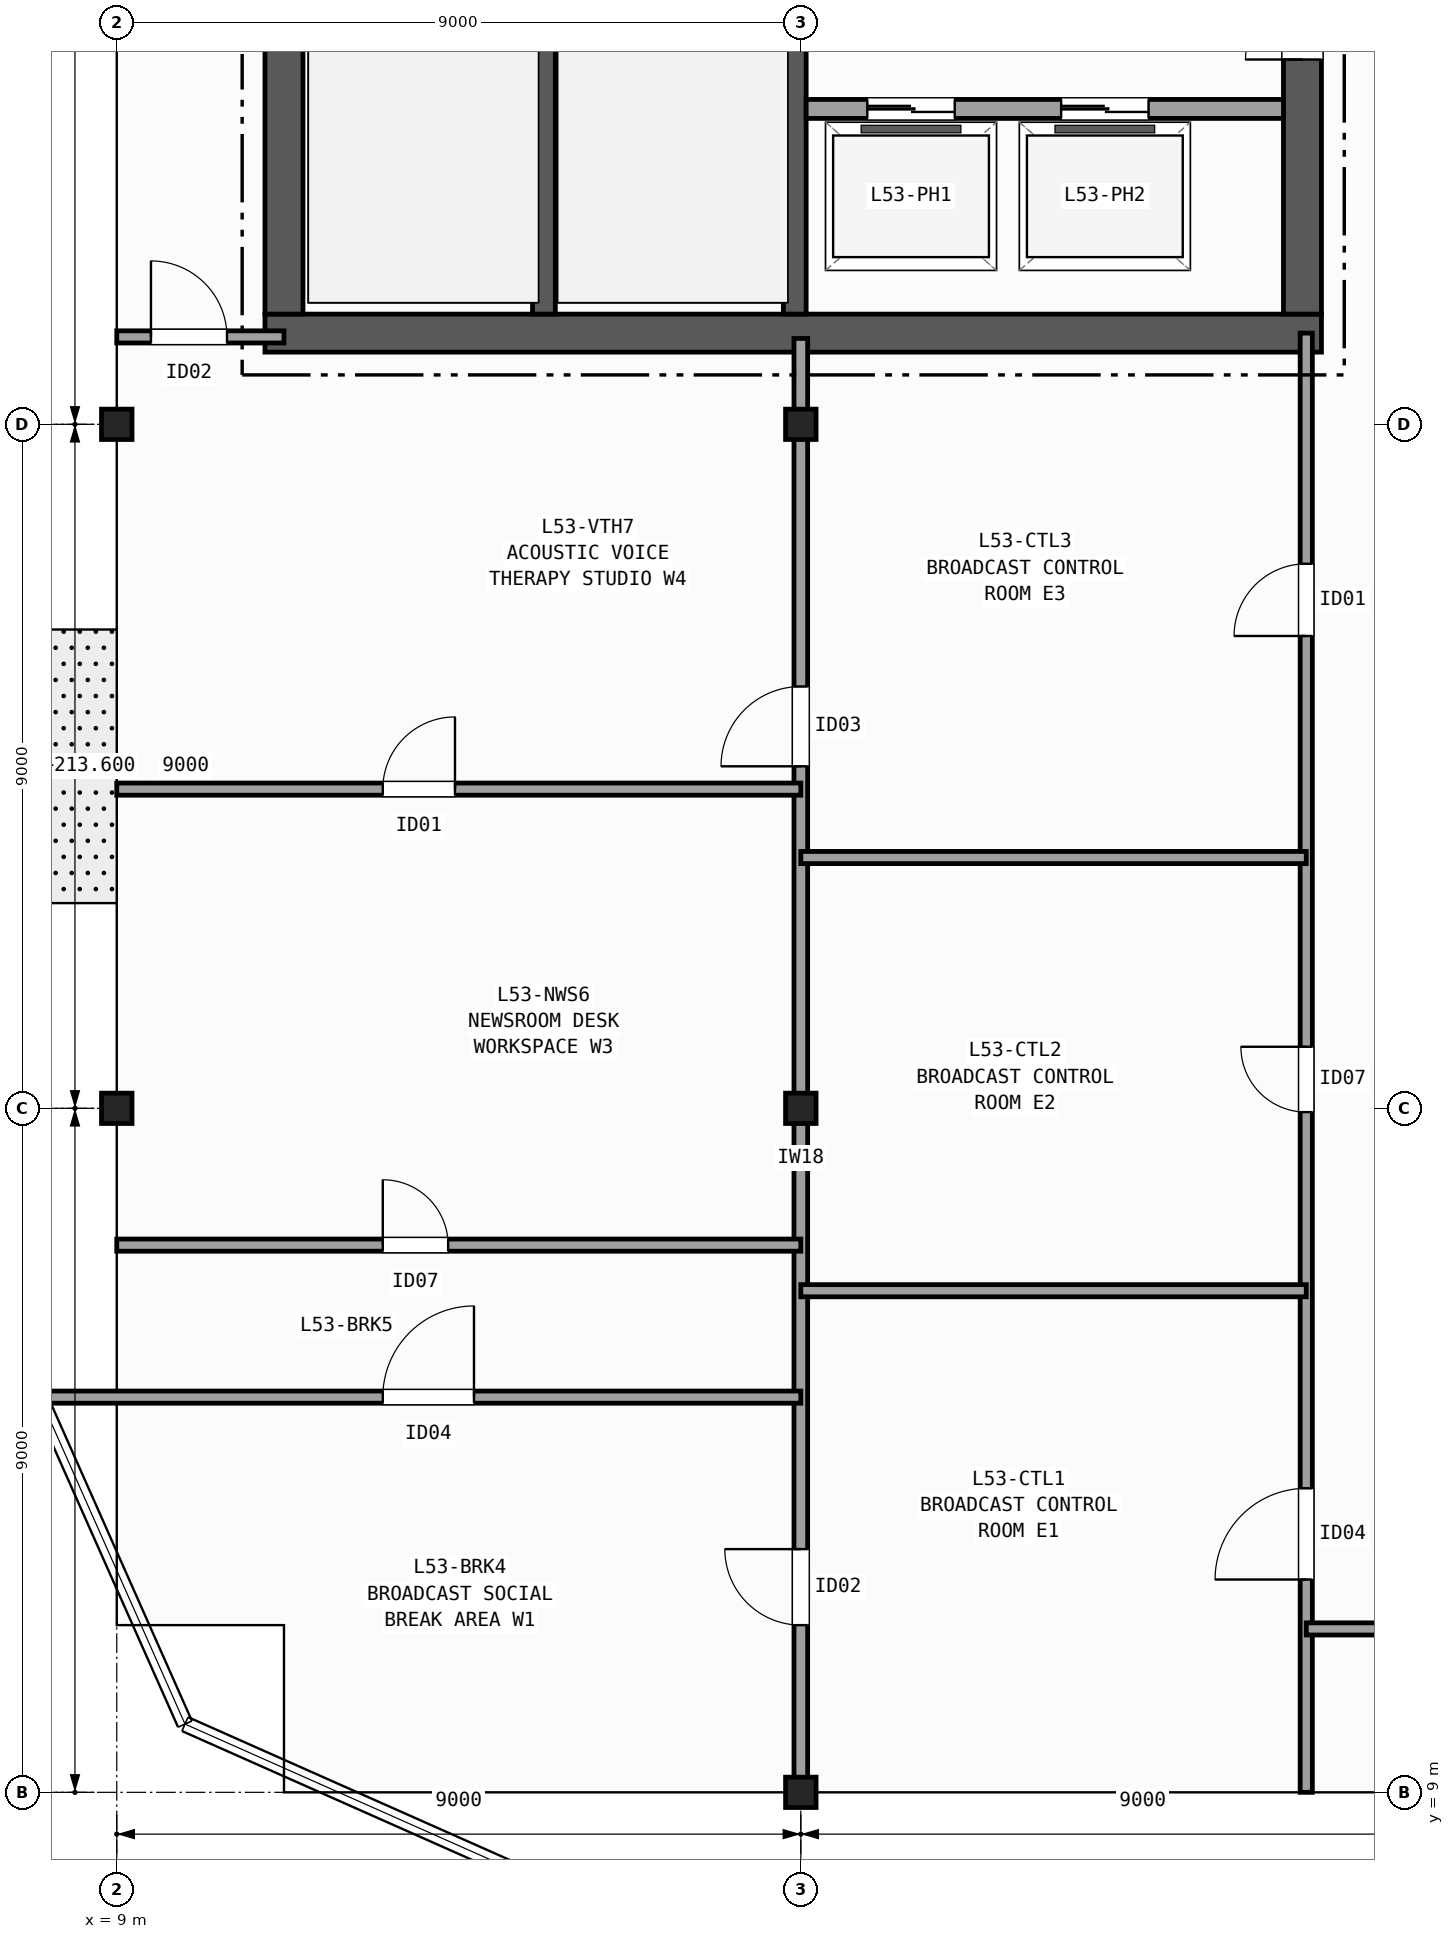
"""IFC4 building model, lengths in metres.
Left out: names, types, materials, properties, quantities, classifications, styles, units other than length and angle.
Written with IfcOpenShell. Run it as: python <this file> out.ifc"""

import sys

from ifc_helpers import new_model, si_unit, direction, frame, frame_2d, origin, origin_2d, place, context, subcontext, project, spatial, rectangle, i_section, extrude, element, fill, save


model = new_model("IFC4")
c1 = context("Model", 3, precision=1e-05, world=origin(), true_north=direction((0.0, 1.0)))
c2 = subcontext(c1, "Body", "Model", "MODEL_VIEW")
j1 = project(units=[si_unit("LENGTHUNIT", "METRE"), si_unit("PLANEANGLEUNIT", "RADIAN")], contexts=[c1])
p1 = place(None, origin())
s1 = spatial("IfcSite", under=j1, at=p1, CompositionType="ELEMENT")
p2 = place(p1, origin())
s2 = spatial("IfcBuilding", under=s1, at=p2, CompositionType="ELEMENT")
p3 = place(p2, frame((0.0, 0.0, 213.6)))
s3 = spatial("IfcBuildingStorey", under=s2, at=p3, CompositionType="ELEMENT", Elevation=213.6)
for number, where, z_axis, x_axis in (
    (1, (9.0, 18.0, 0.0), (0.0, 0.0, 1.0), (1.0, 0.0, 0.0)),
    (2, (9.0, 27.0, 0.0), (0.0, 0.0, 1.0), (1.0, 0.0, 0.0)),
    (3, (18.0, 9.0, 0.0), (0.0, 0.0, 1.0), (1.0, 0.0, 0.0)),
    (4, (18.0, 18.0, 0.0), (0.0, 0.0, 1.0), (1.0, 0.0, 0.0)),
    (5, (18.0, 27.0, 0.0), (0.0, 0.0, 1.0), (1.0, 0.0, 0.0)),
):
    element("IfcColumn", number, at=place(p3, frame(where, z_axis=z_axis, x_axis=x_axis)), inside=s3, PredefinedType="COLUMN", context=c2, shape_type="SweptSolid", body=[
        extrude(i_section(OverallWidth=0.401, OverallDepth=0.399, WebThickness=0.025, FlangeThickness=0.04, FilletRadius=0.015, at=origin_2d()), origin(), (0.0, 0.0, 1.0), 3.7),
    ])
p4 = place(p3, frame((10.95, 28.2, 0.0), z_axis=(0.0, 0.0, 1.0), x_axis=(1.0, 0.0, 0.0)))
e6 = element("IfcWall", 6, at=p4, inside=s3, PredefinedType="SHEAR", context=c2, shape_type="SweptSolid", body=[
    extrude(rectangle(XDim=13.9, YDim=0.5, at=frame_2d((6.95, 0.0))), origin(), (0.0, 0.0, 1.0), 3.42),
])
p5 = place(p3, frame((11.2, 42.15, 0.0), z_axis=(0.0, 0.0, 1.0), x_axis=(0.0, -1.0, 0.0)))
e7 = element("IfcWall", 7, at=p5, inside=s3, PredefinedType="SHEAR", context=c2, shape_type="SweptSolid", body=[
    extrude(rectangle(XDim=13.7, YDim=0.5, at=frame_2d((6.85, 0.0))), origin(), (0.0, 0.0, 1.0), 3.42),
])
p6 = place(p3, frame((24.6, 28.45, 0.0), z_axis=(0.0, 0.0, 1.0), x_axis=(0.0, 1.0, 0.0)))
e8 = element("IfcWall", 8, at=p6, inside=s3, PredefinedType="SHEAR", context=c2, shape_type="SweptSolid", body=[
    extrude(rectangle(XDim=13.7, YDim=0.5, at=frame_2d((6.85, 0.0))), origin(), (0.0, 0.0, 1.0), 3.42),
])
p7 = place(p6, frame((3.35, 0.0, 0.0)))
e9 = element("IfcOpeningElement", 9, at=p7, cuts=e8, PredefinedType="OPENING", context=c2, shape_type="SweptSolid", body=[
    extrude(rectangle(XDim=1.5, YDim=2.2, at=frame_2d((0.75, 1.1))), frame((0.0, 0.26, 0.0), z_axis=(0.0, -1.0, 0.0), x_axis=(1.0, 0.0, 0.0)), (0.0, 0.0, 1.0), 0.52),
])
p8 = place(p6, frame((9.95, 0.0, 0.0)))
e10 = element("IfcOpeningElement", 10, at=p8, cuts=e8, PredefinedType="OPENING", context=c2, shape_type="SweptSolid", body=[
    extrude(rectangle(XDim=0.9, YDim=2.1, at=frame_2d((0.45, 1.05))), frame((0.0, 0.26, 0.0), z_axis=(0.0, -1.0, 0.0), x_axis=(1.0, 0.0, 0.0)), (0.0, 0.0, 1.0), 0.52),
])
p9 = place(p3, frame((14.62, 28.45, 0.0), z_axis=(0.0, 0.0, 1.0), x_axis=(0.0, 1.0, 0.0)))
e11 = element("IfcWall", 11, at=p9, inside=s3, PredefinedType="SHEAR", context=c2, shape_type="SweptSolid", body=[
    extrude(rectangle(XDim=9.0, YDim=0.3, at=frame_2d((4.5, 0.0))), origin(), (0.0, 0.0, 1.0), 3.42),
])
p10 = place(p3, frame((17.92, 42.15, 0.0), z_axis=(0.0, 0.0, 1.0), x_axis=(0.0, -1.0, 0.0)))
e12 = element("IfcWall", 12, at=p10, inside=s3, PredefinedType="SHEAR", context=c2, shape_type="SweptSolid", body=[
    extrude(rectangle(XDim=13.7, YDim=0.3, at=frame_2d((6.85, 0.0))), origin(), (0.0, 0.0, 1.0), 3.42),
])
p11 = place(p10, frame((1.975, 0.0, 0.0)))
e13 = element("IfcOpeningElement", 13, at=p11, cuts=e12, PredefinedType="OPENING", context=c2, shape_type="SweptSolid", body=[
    extrude(rectangle(XDim=1.15, YDim=2.15, at=frame_2d((0.575, 1.075))), frame((0.0, 0.16, 0.0), z_axis=(0.0, -1.0, 0.0), x_axis=(1.0, 0.0, 0.0)), (0.0, 0.0, 1.0), 0.32),
])
p12 = place(p3, frame((18.07, 31.15, 0.0), z_axis=(0.0, 0.0, 1.0), x_axis=(1.0, 0.0, 0.0)))
e14 = element("IfcWall", 14, at=p12, inside=s3, PredefinedType="PARTITIONING", context=c2, shape_type="SweptSolid", body=[
    extrude(rectangle(XDim=6.28, YDim=0.25, at=frame_2d((3.14, 0.0))), origin(), (0.0, 0.0, 1.0), 3.42),
])
p13 = place(p12, frame((0.805, 0.0, 0.0)))
e15 = element("IfcOpeningElement", 15, at=p13, cuts=e14, PredefinedType="OPENING", context=c2, shape_type="SweptSolid", body=[
    extrude(rectangle(XDim=1.15, YDim=2.15, at=frame_2d((0.575, 1.075))), frame((0.0, 0.135, 0.0), z_axis=(0.0, -1.0, 0.0), x_axis=(1.0, 0.0, 0.0)), (0.0, 0.0, 1.0), 0.27),
])
p14 = place(p12, frame((3.355, 0.0, 0.0)))
e16 = element("IfcOpeningElement", 16, at=p14, cuts=e14, PredefinedType="OPENING", context=c2, shape_type="SweptSolid", body=[
    extrude(rectangle(XDim=1.15, YDim=2.15, at=frame_2d((0.575, 1.075))), frame((0.0, 0.135, 0.0), z_axis=(0.0, -1.0, 0.0), x_axis=(1.0, 0.0, 0.0)), (0.0, 0.0, 1.0), 0.27),
])
p15 = place(p3, frame((9.0, 28.15, 0.0), z_axis=(0.0, 0.0, 1.0), x_axis=(1.0, 0.0, 0.0)))
e17 = element("IfcWall", 17, at=p15, inside=s3, PredefinedType="PARTITIONING", context=c2, shape_type="SweptSolid", body=[
    extrude(rectangle(XDim=2.2, YDim=0.16, at=frame_2d((1.1, 0.0))), origin(), (0.0, 0.0, 1.0), 2.707),
])
p16 = place(p15, frame((0.45, 0.0, 0.0)))
e18 = element("IfcOpeningElement", 18, at=p16, cuts=e17, PredefinedType="OPENING", context=c2, shape_type="SweptSolid", body=[
    extrude(rectangle(XDim=1.0, YDim=2.1, at=frame_2d((0.5, 1.05))), frame((0.0, 0.09, 0.0), z_axis=(0.0, -1.0, 0.0), x_axis=(1.0, 0.0, 0.0)), (0.0, 0.0, 1.0), 0.18),
])
p17 = place(p3, frame((24.65, 9.0, 0.0), z_axis=(0.0, 0.0, 1.0), x_axis=(0.0, 1.0, 0.0)))
e19 = element("IfcWall", 19, at=p17, inside=s3, PredefinedType="PARTITIONING", context=c2, shape_type="SweptSolid", body=[
    extrude(rectangle(XDim=19.2, YDim=0.16, at=frame_2d((9.6, 0.0))), origin(), (0.0, 0.0, 1.0), 2.707),
])
p18 = place(p17, frame((2.8, 0.0, 0.0)))
e20 = element("IfcOpeningElement", 20, at=p18, cuts=e19, PredefinedType="OPENING", context=c2, shape_type="SweptSolid", body=[
    extrude(rectangle(XDim=1.2, YDim=2.15, at=frame_2d((0.6, 1.075))), frame((0.0, 0.09, 0.0), z_axis=(0.0, -1.0, 0.0), x_axis=(1.0, 0.0, 0.0)), (0.0, 0.0, 1.0), 0.18),
])
p19 = place(p17, frame((8.95, 0.0, 0.0)))
e21 = element("IfcOpeningElement", 21, at=p19, cuts=e19, PredefinedType="OPENING", context=c2, shape_type="SweptSolid", body=[
    extrude(rectangle(XDim=0.86, YDim=2.05, at=frame_2d((0.43, 1.025))), frame((0.0, 0.09, 0.0), z_axis=(0.0, -1.0, 0.0), x_axis=(1.0, 0.0, 0.0)), (0.0, 0.0, 1.0), 0.18),
])
p20 = place(p17, frame((15.215, 0.0, 0.0)))
e22 = element("IfcOpeningElement", 22, at=p20, cuts=e19, PredefinedType="OPENING", context=c2, shape_type="SweptSolid", body=[
    extrude(rectangle(XDim=0.95, YDim=2.1, at=frame_2d((0.475, 1.05))), frame((0.0, 0.09, 0.0), z_axis=(0.0, -1.0, 0.0), x_axis=(1.0, 0.0, 0.0)), (0.0, 0.0, 1.0), 0.18),
])
p21 = place(p3, frame((18.0, 9.0, 0.0), z_axis=(0.0, 0.0, 1.0), x_axis=(0.0, 1.0, 0.0)))
e23 = element("IfcWall", 23, at=p21, inside=s3, PredefinedType="PARTITIONING", context=c2, shape_type="SweptSolid", body=[
    extrude(rectangle(XDim=19.13, YDim=0.18, at=frame_2d((9.565, 0.0))), origin(), (0.0, 0.0, 1.0), 2.707),
])
p22 = place(p21, frame((2.2, 0.0, 0.0)))
e24 = element("IfcOpeningElement", 24, at=p22, cuts=e23, PredefinedType="OPENING", context=c2, shape_type="SweptSolid", body=[
    extrude(rectangle(XDim=1.0, YDim=2.1, at=frame_2d((0.5, 1.05))), frame((0.0, 0.1, 0.0), z_axis=(0.0, -1.0, 0.0), x_axis=(1.0, 0.0, 0.0)), (0.0, 0.0, 1.0), 0.2),
])
p23 = place(p21, frame((13.5, 0.0, 0.0)))
e25 = element("IfcOpeningElement", 25, at=p23, cuts=e23, PredefinedType="OPENING", context=c2, shape_type="SweptSolid", body=[
    extrude(rectangle(XDim=1.05, YDim=2.15, at=frame_2d((0.525, 1.075))), frame((0.0, 0.1, 0.0), z_axis=(0.0, -1.0, 0.0), x_axis=(1.0, 0.0, 0.0)), (0.0, 0.0, 1.0), 0.2),
])
p24 = place(p3, frame((18.0, 15.6, 0.0), z_axis=(0.0, 0.0, 1.0), x_axis=(1.0, 0.0, 0.0)))
e26 = element("IfcWall", 26, at=p24, inside=s3, PredefinedType="PARTITIONING", context=c2, shape_type="SweptSolid", body=[
    extrude(rectangle(XDim=6.65, YDim=0.16, at=frame_2d((3.325, 0.0))), origin(), (0.0, 0.0, 1.0), 2.789),
])
p25 = place(p3, frame((18.0, 21.3, 0.0), z_axis=(0.0, 0.0, 1.0), x_axis=(1.0, 0.0, 0.0)))
e27 = element("IfcWall", 27, at=p25, inside=s3, PredefinedType="PARTITIONING", context=c2, shape_type="SweptSolid", body=[
    extrude(rectangle(XDim=6.65, YDim=0.16, at=frame_2d((3.325, 0.0))), origin(), (0.0, 0.0, 1.0), 2.792),
])
p26 = place(p3, frame((7.987, 14.2, 0.0), z_axis=(0.0, 0.0, 1.0), x_axis=(1.0, 0.0, 0.0)))
e28 = element("IfcWall", 28, at=p26, inside=s3, PredefinedType="PARTITIONING", context=c2, shape_type="SweptSolid", body=[
    extrude(rectangle(XDim=10.013, YDim=0.16, at=frame_2d((5.006, 0.0))), origin(), (0.0, 0.0, 1.0), 2.792),
])
p27 = place(p26, frame((4.513, 0.0, 0.0)))
e29 = element("IfcOpeningElement", 29, at=p27, cuts=e28, PredefinedType="OPENING", context=c2, shape_type="SweptSolid", body=[
    extrude(rectangle(XDim=1.2, YDim=2.15, at=frame_2d((0.6, 1.075))), frame((0.0, 0.09, 0.0), z_axis=(0.0, -1.0, 0.0), x_axis=(1.0, 0.0, 0.0)), (0.0, 0.0, 1.0), 0.18),
])
p28 = place(p3, frame((9.0, 16.2, 0.0), z_axis=(0.0, 0.0, 1.0), x_axis=(1.0, 0.0, 0.0)))
e30 = element("IfcWall", 30, at=p28, inside=s3, PredefinedType="PARTITIONING", context=c2, shape_type="SweptSolid", body=[
    extrude(rectangle(XDim=9.0, YDim=0.16, at=frame_2d((4.5, 0.0))), origin(), (0.0, 0.0, 1.0), 2.792),
])
p29 = place(p28, frame((3.5, 0.0, 0.0)))
e31 = element("IfcOpeningElement", 31, at=p29, cuts=e30, PredefinedType="OPENING", context=c2, shape_type="SweptSolid", body=[
    extrude(rectangle(XDim=0.86, YDim=2.05, at=frame_2d((0.43, 1.025))), frame((0.0, 0.09, 0.0), z_axis=(0.0, -1.0, 0.0), x_axis=(1.0, 0.0, 0.0)), (0.0, 0.0, 1.0), 0.18),
])
p30 = place(p3, frame((9.0, 22.2, 0.0), z_axis=(0.0, 0.0, 1.0), x_axis=(1.0, 0.0, 0.0)))
e32 = element("IfcWall", 32, at=p30, inside=s3, PredefinedType="PARTITIONING", context=c2, shape_type="SweptSolid", body=[
    extrude(rectangle(XDim=9.0, YDim=0.16, at=frame_2d((4.5, 0.0))), origin(), (0.0, 0.0, 1.0), 2.707),
])
p31 = place(p30, frame((3.5, 0.0, 0.0)))
e33 = element("IfcOpeningElement", 33, at=p31, cuts=e32, PredefinedType="OPENING", context=c2, shape_type="SweptSolid", body=[
    extrude(rectangle(XDim=0.95, YDim=2.1, at=frame_2d((0.475, 1.05))), frame((0.0, 0.09, 0.0), z_axis=(0.0, -1.0, 0.0), x_axis=(1.0, 0.0, 0.0)), (0.0, 0.0, 1.0), 0.18),
])
p32 = place(p3, frame((24.65, 11.15, 0.0), z_axis=(0.0, 0.0, 1.0), x_axis=(1.0, 0.0, 0.0)))
e34 = element("IfcWall", 34, at=p32, inside=s3, PredefinedType="PARTITIONING", context=c2, shape_type="SweptSolid", body=[
    extrude(rectangle(XDim=4.75, YDim=0.16, at=frame_2d((2.375, 0.0))), origin(), (0.0, 0.0, 1.0), 2.792),
])
p33 = place(p32, frame((1.2, 0.0, 0.0)))
e35 = element("IfcOpeningElement", 35, at=p33, cuts=e34, PredefinedType="OPENING", context=c2, shape_type="SweptSolid", body=[
    extrude(rectangle(XDim=1.0, YDim=2.1, at=frame_2d((0.5, 1.05))), frame((0.0, 0.09, 0.0), z_axis=(0.0, -1.0, 0.0), x_axis=(1.0, 0.0, 0.0)), (0.0, 0.0, 1.0), 0.18),
])
p34 = place(p7, origin())
e36 = element("IfcDoor", 36, at=p34, inside=s3, OperationType="DOUBLE_DOOR_SINGLE_SWING", PredefinedType="DOOR", context=c2, shape_type="SweptSolid", body=[
    extrude(rectangle(XDim=1.5, YDim=2.2, at=frame_2d((0.75, 1.1))), frame((0.0, 0.025, 0.0), z_axis=(0.0, -1.0, 0.0), x_axis=(1.0, 0.0, 0.0)), (0.0, 0.0, 1.0), 0.05),
])
fill(e9, e36)
p35 = place(p13, origin())
e37 = element("IfcDoor", 37, at=p35, inside=s3, OperationType="DOUBLE_DOOR_SLIDING", PredefinedType="DOOR", context=c2, shape_type="SweptSolid", body=[
    extrude(rectangle(XDim=1.15, YDim=2.15, at=frame_2d((0.575, 1.075))), frame((0.0, 0.025, 0.0), z_axis=(0.0, -1.0, 0.0), x_axis=(1.0, 0.0, 0.0)), (0.0, 0.0, 1.0), 0.05),
])
fill(e15, e37)
p36 = place(p14, origin())
e38 = element("IfcDoor", 38, at=p36, inside=s3, OperationType="DOUBLE_DOOR_SLIDING", PredefinedType="DOOR", context=c2, shape_type="SweptSolid", body=[
    extrude(rectangle(XDim=1.15, YDim=2.15, at=frame_2d((0.575, 1.075))), frame((0.0, 0.025, 0.0), z_axis=(0.0, -1.0, 0.0), x_axis=(1.0, 0.0, 0.0)), (0.0, 0.0, 1.0), 0.05),
])
fill(e16, e38)
p37 = place(p16, origin())
e39 = element("IfcDoor", 39, at=p37, inside=s3, OperationType="SINGLE_SWING_LEFT", PredefinedType="DOOR", context=c2, shape_type="SweptSolid", body=[
    extrude(rectangle(XDim=1.0, YDim=2.1, at=frame_2d((0.5, 1.05))), frame((0.0, 0.025, 0.0), z_axis=(0.0, -1.0, 0.0), x_axis=(1.0, 0.0, 0.0)), (0.0, 0.0, 1.0), 0.05),
])
fill(e18, e39)
p38 = place(p18, origin())
e40 = element("IfcDoor", 40, at=p38, inside=s3, OperationType="SINGLE_SWING_LEFT", PredefinedType="DOOR", context=c2, shape_type="SweptSolid", body=[
    extrude(rectangle(XDim=1.2, YDim=2.15, at=frame_2d((0.6, 1.075))), frame((0.0, 0.025, 0.0), z_axis=(0.0, -1.0, 0.0), x_axis=(1.0, 0.0, 0.0)), (0.0, 0.0, 1.0), 0.05),
])
fill(e20, e40)
p39 = place(p19, origin())
e41 = element("IfcDoor", 41, at=p39, inside=s3, OperationType="SINGLE_SWING_RIGHT", PredefinedType="DOOR", context=c2, shape_type="SweptSolid", body=[
    extrude(rectangle(XDim=0.86, YDim=2.05, at=frame_2d((0.43, 1.025))), frame((0.0, 0.025, 0.0), z_axis=(0.0, -1.0, 0.0), x_axis=(1.0, 0.0, 0.0)), (0.0, 0.0, 1.0), 0.05),
])
fill(e21, e41)
p40 = place(p20, origin())
e42 = element("IfcDoor", 42, at=p40, inside=s3, OperationType="SINGLE_SWING_LEFT", PredefinedType="DOOR", context=c2, shape_type="SweptSolid", body=[
    extrude(rectangle(XDim=0.95, YDim=2.1, at=frame_2d((0.475, 1.05))), frame((0.0, 0.025, 0.0), z_axis=(0.0, -1.0, 0.0), x_axis=(1.0, 0.0, 0.0)), (0.0, 0.0, 1.0), 0.05),
])
fill(e22, e42)
p41 = place(p22, origin())
e43 = element("IfcDoor", 43, at=p41, inside=s3, OperationType="SINGLE_SWING_RIGHT", PredefinedType="DOOR", context=c2, shape_type="SweptSolid", body=[
    extrude(rectangle(XDim=1.0, YDim=2.1, at=frame_2d((0.5, 1.05))), frame((0.0, 0.025, 0.0), z_axis=(0.0, -1.0, 0.0), x_axis=(1.0, 0.0, 0.0)), (0.0, 0.0, 1.0), 0.05),
])
fill(e24, e43)
p42 = place(p23, origin())
e44 = element("IfcDoor", 44, at=p42, inside=s3, OperationType="SINGLE_SWING_LEFT", PredefinedType="DOOR", context=c2, shape_type="SweptSolid", body=[
    extrude(rectangle(XDim=1.05, YDim=2.15, at=frame_2d((0.525, 1.075))), frame((0.0, 0.025, 0.0), z_axis=(0.0, -1.0, 0.0), x_axis=(1.0, 0.0, 0.0)), (0.0, 0.0, 1.0), 0.05),
])
fill(e25, e44)
p43 = place(p27, origin())
e45 = element("IfcDoor", 45, at=p43, inside=s3, OperationType="SINGLE_SWING_RIGHT", PredefinedType="DOOR", context=c2, shape_type="SweptSolid", body=[
    extrude(rectangle(XDim=1.2, YDim=2.15, at=frame_2d((0.6, 1.075))), frame((0.0, 0.025, 0.0), z_axis=(0.0, -1.0, 0.0), x_axis=(1.0, 0.0, 0.0)), (0.0, 0.0, 1.0), 0.05),
])
fill(e29, e45)
p44 = place(p29, origin())
e46 = element("IfcDoor", 46, at=p44, inside=s3, OperationType="SINGLE_SWING_LEFT", PredefinedType="DOOR", context=c2, shape_type="SweptSolid", body=[
    extrude(rectangle(XDim=0.86, YDim=2.05, at=frame_2d((0.43, 1.025))), frame((0.0, 0.025, 0.0), z_axis=(0.0, -1.0, 0.0), x_axis=(1.0, 0.0, 0.0)), (0.0, 0.0, 1.0), 0.05),
])
fill(e31, e46)
p45 = place(p31, origin())
e47 = element("IfcDoor", 47, at=p45, inside=s3, OperationType="SINGLE_SWING_RIGHT", PredefinedType="DOOR", context=c2, shape_type="SweptSolid", body=[
    extrude(rectangle(XDim=0.95, YDim=2.1, at=frame_2d((0.475, 1.05))), frame((0.0, 0.025, 0.0), z_axis=(0.0, -1.0, 0.0), x_axis=(1.0, 0.0, 0.0)), (0.0, 0.0, 1.0), 0.05),
])
fill(e33, e47)
save(model, sys.argv[1])
